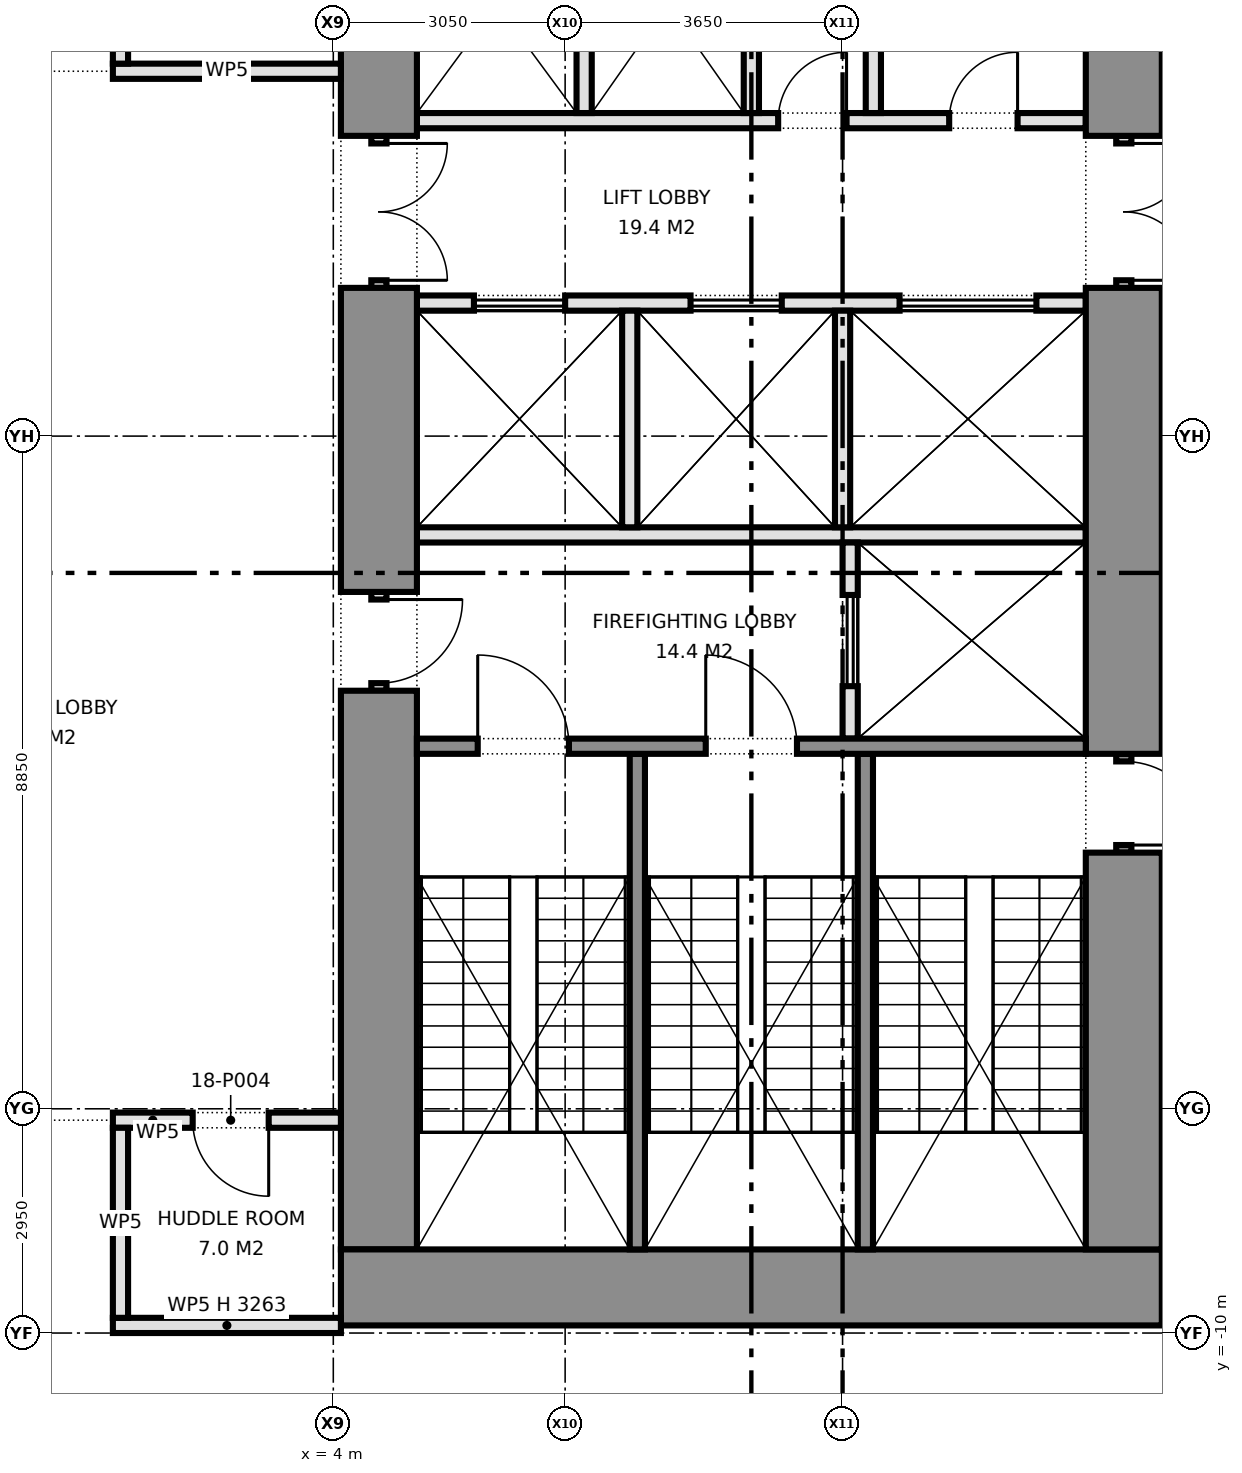
"""IFC4 building model, lengths in metres.
Left out: names, types, materials, properties, quantities, classifications, styles, units other than length and angle.
Written with IfcOpenShell. Run it as: python <this file> out.ifc"""

import sys

from ifc_helpers import new_model, si_unit, direction, frame, frame_2d, origin, place, context, subcontext, project, spatial, rectangle, extrude, element, fill, save


model = new_model("IFC4")
c1 = context("Model", 3, precision=1e-05, world=origin(), true_north=direction((0.0, 1.0)))
c2 = subcontext(c1, "Body", "Model", "MODEL_VIEW")
j1 = project(units=[si_unit("LENGTHUNIT", "METRE"), si_unit("PLANEANGLEUNIT", "RADIAN")], contexts=[c1])
p1 = place(None, origin())
s1 = spatial("IfcSite", under=j1, at=p1, CompositionType="ELEMENT")
p2 = place(p1, origin())
s2 = spatial("IfcBuilding", under=s1, at=p2, CompositionType="ELEMENT")
p3 = place(p2, frame((0.0, 0.0, 82.0)))
s3 = spatial("IfcBuildingStorey", under=s2, at=p3, CompositionType="ELEMENT", Elevation=82.0)
p4 = place(p3, frame((14.9, -9.4, 0.0), z_axis=(0.0, 0.0, 1.0), x_axis=(-1.0, 0.0, 0.0)))
e1 = element("IfcWall", 1, at=p4, inside=s3, PredefinedType="SHEAR", context=c2, shape_type="SweptSolid", body=[
    extrude(rectangle(XDim=10.8, YDim=1.0, at=frame_2d((5.4, 0.0))), origin(), (0.0, 0.0, 1.0), 4.2),
])
p5 = place(p3, frame((14.4, 8.9, 0.0), z_axis=(0.0, 0.0, 1.0), x_axis=(0.0, -1.0, 0.0)))
e2 = element("IfcWall", 2, at=p5, inside=s3, PredefinedType="SHEAR", context=c2, shape_type="SweptSolid", body=[
    extrude(rectangle(XDim=3.15, YDim=1.0, at=frame_2d((1.575, 0.0))), origin(), (0.0, 0.0, 1.0), 4.2),
])
p6 = place(p3, frame((14.4, 5.75, 0.0), z_axis=(0.0, 0.0, 1.0), x_axis=(0.0, -1.0, 0.0)))
e3 = element("IfcWall", 3, at=p6, inside=s3, PredefinedType="PARTITIONING", context=c2, shape_type="SweptSolid", body=[
    extrude(rectangle(XDim=2.0, YDim=0.2, at=frame_2d((1.0, 0.0))), origin(), (0.0, 0.0, 1.0), 2.4),
])
p7 = place(p6, frame((0.1, 0.0, 0.0)))
e4 = element("IfcOpeningElement", 4, at=p7, cuts=e3, PredefinedType="OPENING", context=c2, shape_type="SweptSolid", body=[
    extrude(rectangle(XDim=1.8, YDim=2.1, at=frame_2d((0.9, 1.05))), frame((0.0, 0.11, 0.0), z_axis=(0.0, -1.0, 0.0), x_axis=(1.0, 0.0, 0.0)), (0.0, 0.0, 1.0), 0.22),
])
p8 = place(p3, frame((14.4, 3.75, 0.0), z_axis=(0.0, 0.0, 1.0), x_axis=(0.0, -1.0, 0.0)))
e5 = element("IfcWall", 5, at=p8, inside=s3, PredefinedType="SHEAR", context=c2, shape_type="SweptSolid", body=[
    extrude(rectangle(XDim=6.13, YDim=1.0, at=frame_2d((3.065, 0.0))), origin(), (0.0, 0.0, 1.0), 4.2),
])
p9 = place(p3, frame((14.4, -2.38, 0.0), z_axis=(0.0, 0.0, 1.0), x_axis=(0.0, -1.0, 0.0)))
e6 = element("IfcWall", 6, at=p9, inside=s3, PredefinedType="SHEAR", context=c2, shape_type="SweptSolid", body=[
    extrude(rectangle(XDim=1.3, YDim=0.2, at=frame_2d((0.65, 0.0))), origin(), (0.0, 0.0, 1.0), 2.4),
])
p10 = place(p9, frame((0.1, 0.0, 0.0)))
e7 = element("IfcOpeningElement", 7, at=p10, cuts=e6, PredefinedType="OPENING", context=c2, shape_type="SweptSolid", body=[
    extrude(rectangle(XDim=1.1, YDim=2.1, at=frame_2d((0.55, 1.05))), frame((0.0, 0.11, 0.0), z_axis=(0.0, -1.0, 0.0), x_axis=(1.0, 0.0, 0.0)), (0.0, 0.0, 1.0), 0.22),
])
p11 = place(p3, frame((14.4, -3.68, 0.0), z_axis=(0.0, 0.0, 1.0), x_axis=(0.0, -1.0, 0.0)))
e8 = element("IfcWall", 8, at=p11, inside=s3, PredefinedType="SHEAR", context=c2, shape_type="SweptSolid", body=[
    extrude(rectangle(XDim=5.22, YDim=1.0, at=frame_2d((2.61, 0.0))), origin(), (0.0, 0.0, 1.0), 4.2),
])
p12 = place(p3, frame((4.6, 8.9, 0.0), z_axis=(0.0, 0.0, 1.0), x_axis=(0.0, -1.0, 0.0)))
e9 = element("IfcWall", 9, at=p12, inside=s3, PredefinedType="SHEAR", context=c2, shape_type="SweptSolid", body=[
    extrude(rectangle(XDim=3.15, YDim=1.0, at=frame_2d((1.575, 0.0))), origin(), (0.0, 0.0, 1.0), 4.2),
])
p13 = place(p3, frame((4.6, 5.75, 0.0), z_axis=(0.0, 0.0, 1.0), x_axis=(0.0, -1.0, 0.0)))
e10 = element("IfcWall", 10, at=p13, inside=s3, PredefinedType="PARTITIONING", context=c2, shape_type="SweptSolid", body=[
    extrude(rectangle(XDim=2.0, YDim=0.2, at=frame_2d((1.0, 0.0))), origin(), (0.0, 0.0, 1.0), 2.4),
])
p14 = place(p13, frame((0.1, 0.0, 0.0)))
e11 = element("IfcOpeningElement", 11, at=p14, cuts=e10, PredefinedType="OPENING", context=c2, shape_type="SweptSolid", body=[
    extrude(rectangle(XDim=1.8, YDim=2.1, at=frame_2d((0.9, 1.05))), frame((0.0, 0.11, 0.0), z_axis=(0.0, -1.0, 0.0), x_axis=(1.0, 0.0, 0.0)), (0.0, 0.0, 1.0), 0.22),
])
p15 = place(p3, frame((4.6, 3.75, 0.0), z_axis=(0.0, 0.0, 1.0), x_axis=(0.0, -1.0, 0.0)))
e12 = element("IfcWall", 12, at=p15, inside=s3, PredefinedType="SHEAR", context=c2, shape_type="SweptSolid", body=[
    extrude(rectangle(XDim=4.0, YDim=1.0, at=frame_2d((2.0, 0.0))), origin(), (0.0, 0.0, 1.0), 4.2),
])
p16 = place(p3, frame((4.6, -0.25, 0.0), z_axis=(0.0, 0.0, 1.0), x_axis=(0.0, -1.0, 0.0)))
e13 = element("IfcWall", 13, at=p16, inside=s3, PredefinedType="PARTITIONING", context=c2, shape_type="SweptSolid", body=[
    extrude(rectangle(XDim=1.3, YDim=0.2, at=frame_2d((0.65, 0.0))), origin(), (0.0, 0.0, 1.0), 2.4),
])
p17 = place(p16, frame((0.1, 0.0, 0.0)))
e14 = element("IfcOpeningElement", 14, at=p17, cuts=e13, PredefinedType="OPENING", context=c2, shape_type="SweptSolid", body=[
    extrude(rectangle(XDim=1.1, YDim=2.1, at=frame_2d((0.55, 1.05))), frame((0.0, 0.11, 0.0), z_axis=(0.0, -1.0, 0.0), x_axis=(1.0, 0.0, 0.0)), (0.0, 0.0, 1.0), 0.22),
])
p18 = place(p3, frame((4.6, -1.55, 0.0), z_axis=(0.0, 0.0, 1.0), x_axis=(0.0, -1.0, 0.0)))
e15 = element("IfcWall", 15, at=p18, inside=s3, PredefinedType="SHEAR", context=c2, shape_type="SweptSolid", body=[
    extrude(rectangle(XDim=7.35, YDim=1.0, at=frame_2d((3.675, 0.0))), origin(), (0.0, 0.0, 1.0), 4.2),
])
p19 = place(p3, frame((13.9, 5.95, 0.0), z_axis=(0.0, 0.0, 1.0), x_axis=(-1.0, 0.0, 0.0)))
e16 = element("IfcWall", 16, at=p19, inside=s3, PredefinedType="PARTITIONING", context=c2, shape_type="SweptSolid", body=[
    extrude(rectangle(XDim=8.8, YDim=0.2, at=frame_2d((4.4, 0.0))), origin(), (0.0, 0.0, 1.0), 4.2),
])
p20 = place(p19, frame((0.897, 0.0, 0.0)))
e17 = element("IfcOpeningElement", 17, at=p20, cuts=e16, PredefinedType="OPENING", context=c2, shape_type="SweptSolid", body=[
    extrude(rectangle(XDim=0.9, YDim=2.1, at=frame_2d((0.45, 1.05))), frame((0.0, 0.11, 0.0), z_axis=(0.0, -1.0, 0.0), x_axis=(1.0, 0.0, 0.0)), (0.0, 0.0, 1.0), 0.22),
])
p21 = place(p19, frame((3.147, 0.0, 0.0)))
e18 = element("IfcOpeningElement", 18, at=p21, cuts=e16, PredefinedType="OPENING", context=c2, shape_type="SweptSolid", body=[
    extrude(rectangle(XDim=0.9, YDim=2.1, at=frame_2d((0.45, 1.05))), frame((0.0, 0.11, 0.0), z_axis=(0.0, -1.0, 0.0), x_axis=(1.0, 0.0, 0.0)), (0.0, 0.0, 1.0), 0.22),
])
p22 = place(p3, frame((13.9, 3.55, 0.0), z_axis=(0.0, 0.0, 1.0), x_axis=(-1.0, 0.0, 0.0)))
e19 = element("IfcWall", 19, at=p22, inside=s3, PredefinedType="PARTITIONING", context=c2, shape_type="SweptSolid", body=[
    extrude(rectangle(XDim=8.8, YDim=0.2, at=frame_2d((4.4, 0.0))), origin(), (0.0, 0.0, 1.0), 4.2),
])
p23 = place(p22, frame((0.65, 0.0, 0.0)))
e20 = element("IfcOpeningElement", 20, at=p23, cuts=e19, PredefinedType="OPENING", context=c2, shape_type="SweptSolid", body=[
    extrude(rectangle(XDim=1.8, YDim=2.1, at=frame_2d((0.9, 1.05))), frame((0.0, 0.11, 0.0), z_axis=(0.0, -1.0, 0.0), x_axis=(1.0, 0.0, 0.0)), (0.0, 0.0, 1.0), 0.22),
])
p24 = place(p22, frame((4.0, 0.0, 0.0)))
e21 = element("IfcOpeningElement", 21, at=p24, cuts=e19, PredefinedType="OPENING", context=c2, shape_type="SweptSolid", body=[
    extrude(rectangle(XDim=1.2, YDim=2.1, at=frame_2d((0.6, 1.05))), frame((0.0, 0.11, 0.0), z_axis=(0.0, -1.0, 0.0), x_axis=(1.0, 0.0, 0.0)), (0.0, 0.0, 1.0), 0.22),
])
p25 = place(p22, frame((6.85, 0.0, 0.0)))
e22 = element("IfcOpeningElement", 22, at=p25, cuts=e19, PredefinedType="OPENING", context=c2, shape_type="SweptSolid", body=[
    extrude(rectangle(XDim=1.2, YDim=2.1, at=frame_2d((0.6, 1.05))), frame((0.0, 0.11, 0.0), z_axis=(0.0, -1.0, 0.0), x_axis=(1.0, 0.0, 0.0)), (0.0, 0.0, 1.0), 0.22),
])
p26 = place(p3, frame((13.9, 0.5, 0.0), z_axis=(0.0, 0.0, 1.0), x_axis=(-1.0, 0.0, 0.0)))
e23 = element("IfcWall", 23, at=p26, inside=s3, PredefinedType="PARTITIONING", context=c2, shape_type="SweptSolid", body=[
    extrude(rectangle(XDim=8.8, YDim=0.2, at=frame_2d((4.4, 0.0))), origin(), (0.0, 0.0, 1.0), 4.2),
])
p27 = place(p3, frame((10.8, 0.4, 0.0), z_axis=(0.0, 0.0, 1.0), x_axis=(0.0, -1.0, 0.0)))
e24 = element("IfcWall", 24, at=p27, inside=s3, PredefinedType="PARTITIONING", context=c2, shape_type="SweptSolid", body=[
    extrude(rectangle(XDim=2.58, YDim=0.2, at=frame_2d((1.29, 0.0))), origin(), (0.0, 0.0, 1.0), 4.2),
])
p28 = place(p27, frame((0.69, 0.0, 0.0)))
e25 = element("IfcOpeningElement", 25, at=p28, cuts=e24, PredefinedType="OPENING", context=c2, shape_type="SweptSolid", body=[
    extrude(rectangle(XDim=1.2, YDim=2.1, at=frame_2d((0.6, 1.05))), frame((0.0, 0.11, 0.0), z_axis=(0.0, -1.0, 0.0), x_axis=(1.0, 0.0, 0.0)), (0.0, 0.0, 1.0), 0.22),
])
p29 = place(p3, frame((13.9, -2.28, 0.0), z_axis=(0.0, 0.0, 1.0), x_axis=(-1.0, 0.0, 0.0)))
e26 = element("IfcWall", 26, at=p29, inside=s3, PredefinedType="SHEAR", context=c2, shape_type="SweptSolid", body=[
    extrude(rectangle(XDim=8.8, YDim=0.2, at=frame_2d((4.4, 0.0))), origin(), (0.0, 0.0, 1.0), 4.2),
])
p30 = place(p29, frame((3.8, 0.0, 0.0)))
e27 = element("IfcOpeningElement", 27, at=p30, cuts=e26, PredefinedType="OPENING", context=c2, shape_type="SweptSolid", body=[
    extrude(rectangle(XDim=1.2, YDim=2.1, at=frame_2d((0.6, 1.05))), frame((0.0, 0.11, 0.0), z_axis=(0.0, -1.0, 0.0), x_axis=(1.0, 0.0, 0.0)), (0.0, 0.0, 1.0), 0.22),
])
p31 = place(p29, frame((6.8, 0.0, 0.0)))
e28 = element("IfcOpeningElement", 28, at=p31, cuts=e26, PredefinedType="OPENING", context=c2, shape_type="SweptSolid", body=[
    extrude(rectangle(XDim=1.2, YDim=2.1, at=frame_2d((0.6, 1.05))), frame((0.0, 0.11, 0.0), z_axis=(0.0, -1.0, 0.0), x_axis=(1.0, 0.0, 0.0)), (0.0, 0.0, 1.0), 0.22),
])
for number, where, z_axis, x_axis in (
    (29, (11.0, -2.38, 0.0), (0.0, 0.0, 1.0), (0.0, -1.0, 0.0)),
    (30, (8.0, -2.38, 0.0), (0.0, 0.0, 1.0), (0.0, -1.0, 0.0)),
):
    element("IfcWall", number, at=place(p3, frame(where, z_axis=z_axis, x_axis=x_axis)), inside=s3, PredefinedType="SHEAR", context=c2, shape_type="SweptSolid", body=[
        extrude(rectangle(XDim=6.52, YDim=0.2, at=frame_2d((3.26, 0.0))), origin(), (0.0, 0.0, 1.0), 4.2),
    ])
for number, where, z_axis, x_axis in (
    (31, (9.5, 8.9, 0.0), (0.0, 0.0, 1.0), (0.0, -1.0, 0.0)),
    (32, (7.3, 8.9, 0.0), (0.0, 0.0, 1.0), (0.0, -1.0, 0.0)),
    (33, (11.105, 8.9, 0.0), (0.0, 0.0, 1.0), (0.0, -1.0, 0.0)),
    (34, (10.7, 3.45, 0.0), (0.0, 0.0, 1.0), (0.0, -1.0, 0.0)),
    (35, (7.9, 3.45, 0.0), (0.0, 0.0, 1.0), (0.0, -1.0, 0.0)),
):
    element("IfcWall", number, at=place(p3, frame(where, z_axis=z_axis, x_axis=x_axis)), inside=s3, PredefinedType="PARTITIONING", context=c2, shape_type="SweptSolid", body=[
        extrude(rectangle(XDim=2.85, YDim=0.2, at=frame_2d((1.425, 0.0))), origin(), (0.0, 0.0, 1.0), 4.2),
    ])
p32 = place(p3, frame((1.1, -9.9, 0.0), z_axis=(0.0, 0.0, 1.0), x_axis=(1.0, 0.0, 0.0)))
e36 = element("IfcWall", 36, at=p32, inside=s3, PredefinedType="PARTITIONING", context=c2, shape_type="SweptSolid", body=[
    extrude(rectangle(XDim=3.0, YDim=0.2, at=frame_2d((1.5, 0.0))), origin(), (0.0, 0.0, 1.0), 3.263),
])
p33 = place(p3, frame((1.1, -7.2, 0.0), z_axis=(0.0, 0.0, 1.0), x_axis=(1.0, 0.0, 0.0)))
e37 = element("IfcWall", 37, at=p33, inside=s3, PredefinedType="PARTITIONING", context=c2, shape_type="SweptSolid", body=[
    extrude(rectangle(XDim=3.0, YDim=0.2, at=frame_2d((1.5, 0.0))), origin(), (0.0, 0.0, 1.0), 4.2),
])
p34 = place(p33, frame((1.05, 0.0, 0.0)))
e38 = element("IfcOpeningElement", 38, at=p34, cuts=e37, PredefinedType="OPENING", context=c2, shape_type="SweptSolid", body=[
    extrude(rectangle(XDim=1.0, YDim=2.1, at=frame_2d((0.5, 1.05))), frame((0.0, 0.11, 0.0), z_axis=(0.0, -1.0, 0.0), x_axis=(1.0, 0.0, 0.0)), (0.0, 0.0, 1.0), 0.22),
])
p35 = place(p3, frame((1.1, 6.6, 0.0), z_axis=(0.0, 0.0, 1.0), x_axis=(1.0, 0.0, 0.0)))
e39 = element("IfcWall", 39, at=p35, inside=s3, PredefinedType="PARTITIONING", context=c2, shape_type="SweptSolid", body=[
    extrude(rectangle(XDim=3.0, YDim=0.2, at=frame_2d((1.5, 0.0))), origin(), (0.0, 0.0, 1.0), 4.2),
])
p36 = place(p3, frame((1.2, -9.8, 0.0), z_axis=(0.0, 0.0, 1.0), x_axis=(0.0, 1.0, 0.0)))
e40 = element("IfcWall", 40, at=p36, inside=s3, PredefinedType="PARTITIONING", context=c2, shape_type="SweptSolid", body=[
    extrude(rectangle(XDim=2.5, YDim=0.2, at=frame_2d((1.25, 0.0))), origin(), (0.0, 0.0, 1.0), 4.2),
])
p37 = place(p3, frame((1.2, 6.7, 0.0), z_axis=(0.0, 0.0, 1.0), x_axis=(0.0, 1.0, 0.0)))
e41 = element("IfcWall", 41, at=p37, inside=s3, PredefinedType="PARTITIONING", context=c2, shape_type="SweptSolid", body=[
    extrude(rectangle(XDim=3.1, YDim=0.2, at=frame_2d((1.55, 0.0))), origin(), (0.0, 0.0, 1.0), 4.2),
])
p38 = place(p37, frame((1.05, 0.0, 0.0)))
e42 = element("IfcOpeningElement", 42, at=p38, cuts=e41, PredefinedType="OPENING", context=c2, shape_type="SweptSolid", body=[
    extrude(rectangle(XDim=1.0, YDim=2.1, at=frame_2d((0.5, 1.05))), frame((0.0, 0.11, 0.0), z_axis=(0.0, -1.0, 0.0), x_axis=(1.0, 0.0, 0.0)), (0.0, 0.0, 1.0), 0.22),
])
p39 = place(p7, origin())
e43 = element("IfcDoor", 43, at=p39, inside=s3, OperationType="DOUBLE_DOOR_SINGLE_SWING", PredefinedType="DOOR", context=c2, shape_type="SweptSolid", body=[
    extrude(rectangle(XDim=1.8, YDim=2.1, at=frame_2d((0.9, 1.05))), frame((0.0, 0.025, 0.0), z_axis=(0.0, -1.0, 0.0), x_axis=(1.0, 0.0, 0.0)), (0.0, 0.0, 1.0), 0.05),
])
fill(e4, e43)
p40 = place(p10, origin())
e44 = element("IfcDoor", 44, at=p40, inside=s3, OperationType="SINGLE_SWING_RIGHT", PredefinedType="DOOR", context=c2, shape_type="SweptSolid", body=[
    extrude(rectangle(XDim=1.1, YDim=2.1, at=frame_2d((0.55, 1.05))), frame((0.0, 0.025, 0.0), z_axis=(0.0, -1.0, 0.0), x_axis=(1.0, 0.0, 0.0)), (0.0, 0.0, 1.0), 0.05),
])
fill(e7, e44)
p41 = place(p14, origin())
e45 = element("IfcDoor", 45, at=p41, inside=s3, OperationType="DOUBLE_DOOR_SINGLE_SWING", PredefinedType="DOOR", context=c2, shape_type="SweptSolid", body=[
    extrude(rectangle(XDim=1.8, YDim=2.1, at=frame_2d((0.9, 1.05))), frame((0.0, 0.025, 0.0), z_axis=(0.0, -1.0, 0.0), x_axis=(1.0, 0.0, 0.0)), (0.0, 0.0, 1.0), 0.05),
])
fill(e11, e45)
p42 = place(p17, origin())
e46 = element("IfcDoor", 46, at=p42, inside=s3, OperationType="SINGLE_SWING_LEFT", PredefinedType="DOOR", context=c2, shape_type="SweptSolid", body=[
    extrude(rectangle(XDim=1.1, YDim=2.1, at=frame_2d((0.55, 1.05))), frame((0.0, 0.025, 0.0), z_axis=(0.0, -1.0, 0.0), x_axis=(1.0, 0.0, 0.0)), (0.0, 0.0, 1.0), 0.05),
])
fill(e14, e46)
p43 = place(p23, origin())
e47 = element("IfcDoor", 47, at=p43, inside=s3, OperationType="DOUBLE_DOOR_SLIDING", PredefinedType="DOOR", context=c2, shape_type="SweptSolid", body=[
    extrude(rectangle(XDim=1.8, YDim=2.1, at=frame_2d((0.9, 1.05))), frame((0.0, 0.025, 0.0), z_axis=(0.0, -1.0, 0.0), x_axis=(1.0, 0.0, 0.0)), (0.0, 0.0, 1.0), 0.05),
])
fill(e20, e47)
p44 = place(p24, origin())
e48 = element("IfcDoor", 48, at=p44, inside=s3, OperationType="DOUBLE_DOOR_SLIDING", PredefinedType="DOOR", context=c2, shape_type="SweptSolid", body=[
    extrude(rectangle(XDim=1.2, YDim=2.1, at=frame_2d((0.6, 1.05))), frame((0.0, 0.025, 0.0), z_axis=(0.0, -1.0, 0.0), x_axis=(1.0, 0.0, 0.0)), (0.0, 0.0, 1.0), 0.05),
])
fill(e21, e48)
p45 = place(p25, origin())
e49 = element("IfcDoor", 49, at=p45, inside=s3, OperationType="DOUBLE_DOOR_SLIDING", PredefinedType="DOOR", context=c2, shape_type="SweptSolid", body=[
    extrude(rectangle(XDim=1.2, YDim=2.1, at=frame_2d((0.6, 1.05))), frame((0.0, 0.025, 0.0), z_axis=(0.0, -1.0, 0.0), x_axis=(1.0, 0.0, 0.0)), (0.0, 0.0, 1.0), 0.05),
])
fill(e22, e49)
p46 = place(p28, origin())
e50 = element("IfcDoor", 50, at=p46, inside=s3, OperationType="DOUBLE_DOOR_SLIDING", PredefinedType="DOOR", context=c2, shape_type="SweptSolid", body=[
    extrude(rectangle(XDim=1.2, YDim=2.1, at=frame_2d((0.6, 1.05))), frame((0.0, 0.025, 0.0), z_axis=(0.0, -1.0, 0.0), x_axis=(1.0, 0.0, 0.0)), (0.0, 0.0, 1.0), 0.05),
])
fill(e25, e50)
p47 = place(p20, frame((0.9, 0.0, 0.0), z_axis=(0.0, 0.0, 1.0), x_axis=(-1.0, 0.0, 0.0)))
e51 = element("IfcDoor", 51, at=p47, inside=s3, OperationType="SINGLE_SWING_RIGHT", PredefinedType="DOOR", context=c2, shape_type="SweptSolid", body=[
    extrude(rectangle(XDim=0.9, YDim=2.1, at=frame_2d((0.45, 1.05))), frame((0.0, 0.025, 0.0), z_axis=(0.0, -1.0, 0.0), x_axis=(1.0, 0.0, 0.0)), (0.0, 0.0, 1.0), 0.05),
])
fill(e17, e51)
p48 = place(p21, frame((0.9, 0.0, 0.0), z_axis=(0.0, 0.0, 1.0), x_axis=(-1.0, 0.0, 0.0)))
e52 = element("IfcDoor", 52, at=p48, inside=s3, OperationType="SINGLE_SWING_RIGHT", PredefinedType="DOOR", context=c2, shape_type="SweptSolid", body=[
    extrude(rectangle(XDim=0.9, YDim=2.1, at=frame_2d((0.45, 1.05))), frame((0.0, 0.025, 0.0), z_axis=(0.0, -1.0, 0.0), x_axis=(1.0, 0.0, 0.0)), (0.0, 0.0, 1.0), 0.05),
])
fill(e18, e52)
p49 = place(p30, frame((1.2, 0.0, 0.0), z_axis=(0.0, 0.0, 1.0), x_axis=(-1.0, 0.0, 0.0)))
e53 = element("IfcDoor", 53, at=p49, inside=s3, OperationType="SINGLE_SWING_LEFT", PredefinedType="DOOR", context=c2, shape_type="SweptSolid", body=[
    extrude(rectangle(XDim=1.2, YDim=2.1, at=frame_2d((0.6, 1.05))), frame((0.0, 0.025, 0.0), z_axis=(0.0, -1.0, 0.0), x_axis=(1.0, 0.0, 0.0)), (0.0, 0.0, 1.0), 0.05),
])
fill(e27, e53)
p50 = place(p31, frame((1.2, 0.0, 0.0), z_axis=(0.0, 0.0, 1.0), x_axis=(-1.0, 0.0, 0.0)))
e54 = element("IfcDoor", 54, at=p50, inside=s3, OperationType="SINGLE_SWING_LEFT", PredefinedType="DOOR", context=c2, shape_type="SweptSolid", body=[
    extrude(rectangle(XDim=1.2, YDim=2.1, at=frame_2d((0.6, 1.05))), frame((0.0, 0.025, 0.0), z_axis=(0.0, -1.0, 0.0), x_axis=(1.0, 0.0, 0.0)), (0.0, 0.0, 1.0), 0.05),
])
fill(e28, e54)
p51 = place(p34, frame((1.0, 0.0, 0.0), z_axis=(0.0, 0.0, 1.0), x_axis=(-1.0, 0.0, 0.0)))
e55 = element("IfcDoor", 55, at=p51, inside=s3, OperationType="SINGLE_SWING_LEFT", PredefinedType="DOOR", context=c2, shape_type="SweptSolid", body=[
    extrude(rectangle(XDim=1.0, YDim=2.1, at=frame_2d((0.5, 1.05))), frame((0.0, 0.025, 0.0), z_axis=(0.0, -1.0, 0.0), x_axis=(1.0, 0.0, 0.0)), (0.0, 0.0, 1.0), 0.05),
])
fill(e38, e55)
save(model, sys.argv[1])
